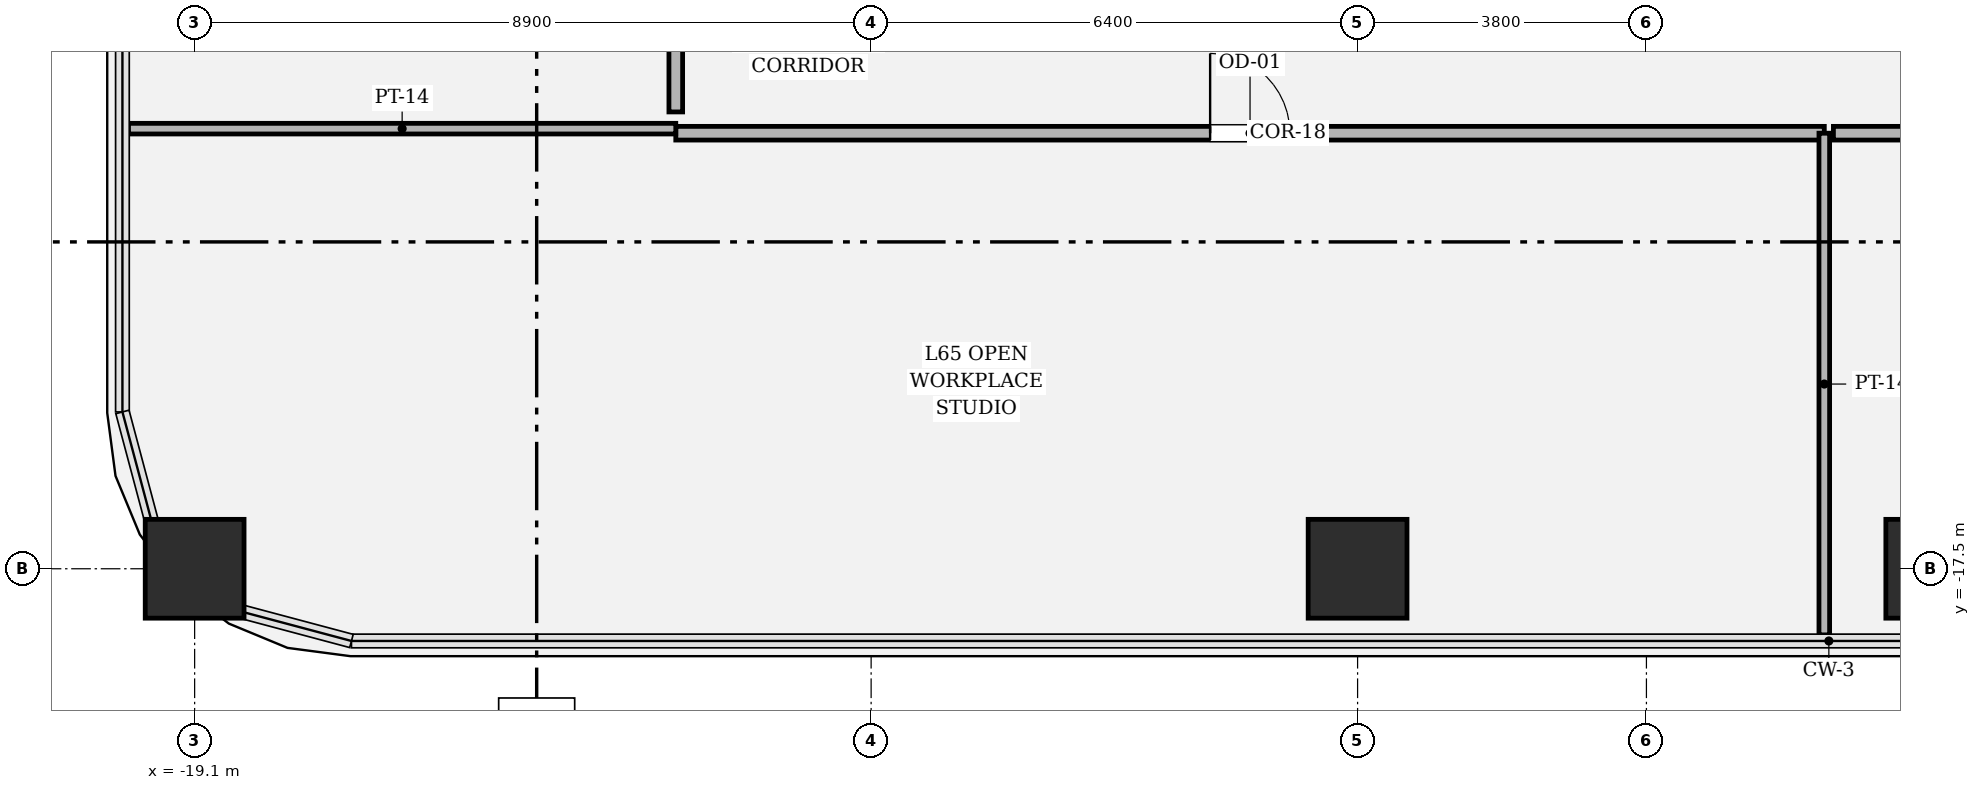
"""IFC4 building model, lengths in metres.
Left out: names, types, materials, properties, quantities, classifications, styles, units other than length and angle.
Written with IfcOpenShell. Run it as: python <this file> out.ifc"""

import sys

from ifc_helpers import new_model, si_unit, direction, frame, frame_2d, origin, origin_2d, place, context, subcontext, project, spatial, rectangle, hollow_rectangle, extrude, element, fill, save


model = new_model("IFC4")
c1 = context("Model", 3, precision=1e-05, world=origin(), true_north=direction((0.0, 1.0)))
c2 = subcontext(c1, "Body", "Model", "MODEL_VIEW")
j1 = project(units=[si_unit("LENGTHUNIT", "METRE"), si_unit("PLANEANGLEUNIT", "RADIAN")], contexts=[c1])
p1 = place(None, origin())
s1 = spatial("IfcSite", under=j1, at=p1, CompositionType="ELEMENT")
p2 = place(p1, origin())
s2 = spatial("IfcBuilding", under=s1, at=p2, CompositionType="ELEMENT")
p3 = place(p2, frame((0.0, 0.0, 275.7)))
s3 = spatial("IfcBuildingStorey", under=s2, at=p3, CompositionType="ELEMENT", Elevation=275.7)
for number, where, z_axis, x_axis in (
    (1, (-19.1, -17.5, 0.0), (0.0, 0.0, 1.0), (1.0, 0.0, 0.0)),
    (2, (-3.8, -17.5, 0.0), (0.0, 0.0, 1.0), (1.0, 0.0, 0.0)),
    (3, (3.8, -17.5, 0.0), (0.0, 0.0, 1.0), (1.0, 0.0, 0.0)),
):
    element("IfcColumn", number, at=place(p3, frame(where, z_axis=z_axis, x_axis=x_axis)), inside=s3, PredefinedType="COLUMN", context=c2, shape_type="SweptSolid", body=[
        extrude(hollow_rectangle(XDim=1.3, YDim=1.3, WallThickness=0.038, at=origin_2d()), origin(), (0.0, 0.0, 1.0), 4.05),
    ])
p4 = place(p3, frame((-12.77, -11.77, 0.0), z_axis=(0.0, 0.0, 1.0), x_axis=(1.0, 0.0, 0.0)))
e4 = element("IfcWall", 4, at=p4, inside=s3, PredefinedType="PARTITIONING", context=c2, shape_type="SweptSolid", body=[
    extrude(rectangle(XDim=15.11, YDim=0.18, at=frame_2d((7.555, 0.0))), origin(), (0.0, 0.0, 1.0), 3.244),
])
p5 = place(p4, frame((7.03, 0.0, 0.0)))
e5 = element("IfcOpeningElement", 5, at=p5, cuts=e4, PredefinedType="OPENING", context=c2, shape_type="SweptSolid", body=[
    extrude(rectangle(XDim=1.05, YDim=2.2, at=frame_2d((0.525, 1.1))), frame((0.0, 0.1, 0.0), z_axis=(0.0, -1.0, 0.0), x_axis=(1.0, 0.0, 0.0)), (0.0, 0.0, 1.0), 0.2),
])
p6 = place(p3, frame((2.34, -11.77, 0.0), z_axis=(0.0, 0.0, 1.0), x_axis=(0.0, -1.0, 0.0)))
e6 = element("IfcWall", 6, at=p6, inside=s3, PredefinedType="PARTITIONING", context=c2, shape_type="SweptSolid", body=[
    extrude(rectangle(XDim=6.6, YDim=0.14, at=frame_2d((3.3, 0.0))), origin(), (0.0, 0.0, 1.0), 3.244),
])
p7 = place(p3, frame((-19.97, -11.71, 0.0), z_axis=(0.0, 0.0, 1.0), x_axis=(1.0, 0.0, 0.0)))
e7 = element("IfcWall", 7, at=p7, inside=s3, PredefinedType="PARTITIONING", context=c2, shape_type="SweptSolid", body=[
    extrude(rectangle(XDim=7.2, YDim=0.14, at=frame_2d((3.6, 0.0))), origin(), (0.0, 0.0, 1.0), 3.244),
])
p8 = place(p3, frame((2.46, -11.77, 0.0), z_axis=(0.0, 0.0, 1.0), x_axis=(1.0, 0.0, 0.0)))
e8 = element("IfcWall", 8, at=p8, inside=s3, PredefinedType="PARTITIONING", context=c2, shape_type="SweptSolid", body=[
    extrude(rectangle(XDim=10.31, YDim=0.18, at=frame_2d((5.155, 0.0))), origin(), (0.0, 0.0, 1.0), 3.244),
])
p9 = place(p8, frame((4.63, 0.0, 0.0)))
e9 = element("IfcOpeningElement", 9, at=p9, cuts=e8, PredefinedType="OPENING", context=c2, shape_type="SweptSolid", body=[
    extrude(rectangle(XDim=1.05, YDim=2.2, at=frame_2d((0.525, 1.1))), frame((0.0, 0.1, 0.0), z_axis=(0.0, -1.0, 0.0), x_axis=(1.0, 0.0, 0.0)), (0.0, 0.0, 1.0), 0.2),
])
p10 = place(p3, frame((-12.77, -1.2, 0.0), z_axis=(0.0, 0.0, 1.0), x_axis=(0.0, -1.0, 0.0)))
e10 = element("IfcWall", 10, at=p10, inside=s3, PredefinedType="PARTITIONING", context=c2, shape_type="SweptSolid", body=[
    extrude(rectangle(XDim=10.29, YDim=0.18, at=frame_2d((5.145, 0.0))), origin(), (0.0, 0.0, 1.0), 3.244),
])
p11 = place(p5, origin())
e11 = element("IfcDoor", 11, at=p11, inside=s3, OperationType="SINGLE_SWING_LEFT", PredefinedType="DOOR", context=c2, shape_type="SweptSolid", body=[
    extrude(rectangle(XDim=1.05, YDim=2.2, at=frame_2d((0.525, 1.1))), frame((0.0, 0.025, 0.0), z_axis=(0.0, -1.0, 0.0), x_axis=(1.0, 0.0, 0.0)), (0.0, 0.0, 1.0), 0.05),
])
fill(e5, e11)
save(model, sys.argv[1])
